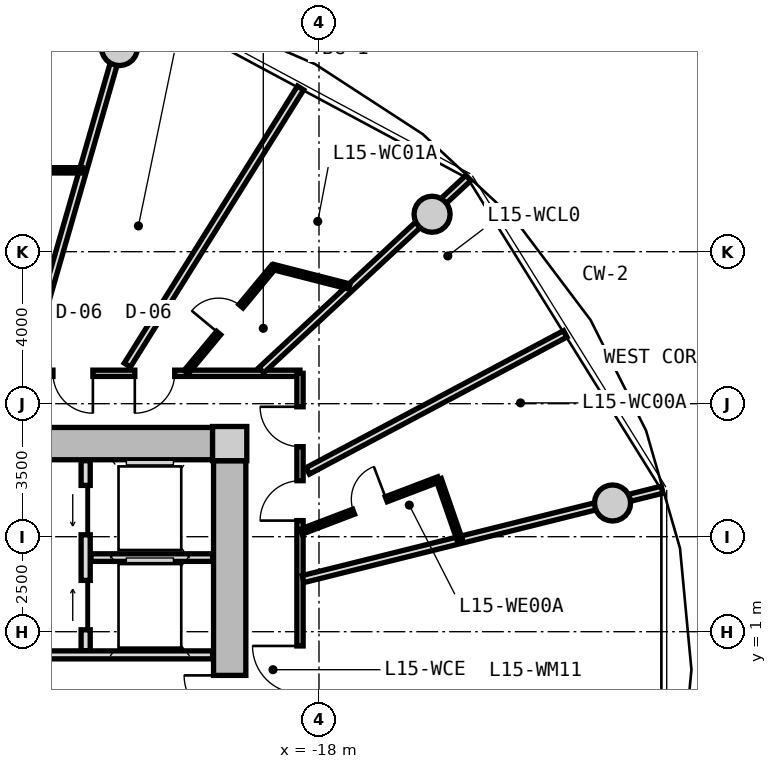
"""IFC4 building model, lengths in metres.
Left out: names, types, materials, properties, quantities, classifications, styles, units other than length and angle.
Written with IfcOpenShell. Run it as: python <this file> out.ifc"""

import sys

from ifc_helpers import new_model, si_unit, direction, frame, frame_2d, origin, origin_2d, place, context, subcontext, project, spatial, rectangle, circle, extrude, source, transform, mapped, element, fill, save


model = new_model("IFC4")
c1 = context("Model", 3, precision=1e-05, world=origin(), true_north=direction((0.0, 1.0)))
c2 = subcontext(c1, "Body", "Model", "MODEL_VIEW")
j1 = project(units=[si_unit("LENGTHUNIT", "METRE"), si_unit("PLANEANGLEUNIT", "RADIAN")], contexts=[c1])
p1 = place(None, origin())
s1 = spatial("IfcSite", under=j1, at=p1, CompositionType="ELEMENT")
p2 = place(p1, origin())
s2 = spatial("IfcBuilding", under=s1, at=p2, CompositionType="ELEMENT")
p3 = place(p2, frame((0.0, 0.0, 52.1)))
s3 = spatial("IfcBuildingStorey", under=s2, at=p3, CompositionType="ELEMENT", Elevation=52.1)
m1 = source(origin(), c2, "Body", "SweptSolid", [
    extrude(rectangle(XDim=0.9, YDim=0.9, at=origin_2d()), origin(), (0.0, 0.0, 1.0), 3.05),
])
p4 = place(p3, frame((-20.35, 5.95, 0.0), z_axis=(0.0, 0.0, 1.0), x_axis=(1.0, 0.0, 0.0)))
e1 = element("IfcColumn", 1, at=p4, inside=s3, PredefinedType="COLUMN", context=c2, shape_type="MappedRepresentation", body=[
    mapped(m1, transform((0.0, 0.0, 0.0), x_axis=(1.0, 0.0, 0.0), y_axis=(0.0, 1.0, 0.0), z_axis=(0.0, 0.0, 1.0), scale=1.0)),
])
m2 = source(origin(), c2, "Body", "SweptSolid", [
    extrude(rectangle(XDim=14.4, YDim=0.85, at=frame_2d((7.2, 0.0))), origin(), (0.0, 0.0, 1.0), 2.79),
])
p5 = place(p3, frame((-35.2, 5.95, 0.0), z_axis=(0.0, 0.0, 1.0), x_axis=(1.0, 0.0, 0.0)))
e2 = element("IfcWall", 2, at=p5, inside=s3, PredefinedType="SHEAR", context=c2, shape_type="MappedRepresentation", body=[
    mapped(m2, transform((0.0, 0.0, 0.0), x_axis=(1.0, 0.0, 0.0), y_axis=(0.0, 1.0, 0.0), z_axis=(0.0, 0.0, 1.0), scale=1.0)),
])
m3 = source(origin(), c2, "Body", "SweptSolid", [
    extrude(rectangle(XDim=11.0, YDim=0.85, at=frame_2d((5.5, 0.0))), origin(), (0.0, 0.0, 1.0), 2.79),
])
p6 = place(p3, frame((-20.35, 5.5, 0.0), z_axis=(0.0, 0.0, 1.0), x_axis=(0.0, -1.0, 0.0)))
e3 = element("IfcWall", 3, at=p6, inside=s3, PredefinedType="SHEAR", context=c2, shape_type="MappedRepresentation", body=[
    mapped(m3, transform((0.0, 0.0, 0.0), x_axis=(1.0, 0.0, 0.0), y_axis=(0.0, 1.0, 0.0), z_axis=(0.0, 0.0, 1.0), scale=1.0)),
])
p7 = place(p6, frame((5.65, 0.0, 0.0)))
e4 = element("IfcOpeningElement", 4, at=p7, cuts=e3, PredefinedType="OPENING", context=c2, shape_type="SweptSolid", body=[
    extrude(rectangle(XDim=1.2, YDim=2.15, at=frame_2d((0.6, 1.075))), frame((0.0, 0.435, 0.0), z_axis=(0.0, -1.0, 0.0), x_axis=(1.0, 0.0, 0.0)), (0.0, 0.0, 1.0), 0.87),
])
m4 = source(origin(), c2, "Body", "SweptSolid", [
    extrude(circle(Radius=0.475, at=origin_2d()), origin(), (0.0, 0.0, 1.0), 3.05),
])
for number, where, z_axis, x_axis in (
    (5, (-10.275, 4.387, 0.0), (0.0, 0.0, 1.0), (1.0, 0.0, 0.0)),
    (6, (-15.025, 11.985, 0.0), (0.0, 0.0, 1.0), (1.0, 0.0, 0.0)),
    (7, (-23.251, 16.373, 0.0), (0.0, 0.0, 1.0), (1.0, 0.0, 0.0)),
):
    element("IfcColumn", number, at=place(p3, frame(where, z_axis=z_axis, x_axis=x_axis)), inside=s3, PredefinedType="COLUMN", context=c2, shape_type="MappedRepresentation", body=[
        mapped(m4, transform((0.0, 0.0, 0.0), x_axis=(1.0, 0.0, 0.0), y_axis=(0.0, 1.0, 0.0), z_axis=(0.0, 0.0, 1.0), scale=1.0)),
    ])
m5 = source(origin(), c2, "Body", "SweptSolid", [
    extrude(rectangle(XDim=5.0, YDim=0.24, at=frame_2d((2.5, 0.0))), origin(), (0.0, 0.0, 1.0), 2.775),
])
p8 = place(p3, frame((-24.14, 0.5, 0.0), z_axis=(0.0, 0.0, 1.0), x_axis=(0.0, 1.0, 0.0)))
e8 = element("IfcWall", 8, at=p8, inside=s3, PredefinedType="PARTITIONING", context=c2, shape_type="MappedRepresentation", body=[
    mapped(m5, transform((0.0, 0.0, 0.0), x_axis=(1.0, 0.0, 0.0), y_axis=(0.0, 1.0, 0.0), z_axis=(0.0, 0.0, 1.0), scale=1.0)),
])
p9 = place(p8, frame((3.05, 0.0, 0.0)))
e9 = element("IfcOpeningElement", 9, at=p9, cuts=e8, PredefinedType="OPENING", context=c2, shape_type="SweptSolid", body=[
    extrude(rectangle(XDim=1.3, YDim=2.2, at=frame_2d((0.65, 1.1))), frame((0.0, 0.13, 0.0), z_axis=(0.0, -1.0, 0.0), x_axis=(1.0, 0.0, 0.0)), (0.0, 0.0, 1.0), 0.26),
])
p10 = place(p8, frame((0.55, 0.0, 0.0)))
e10 = element("IfcOpeningElement", 10, at=p10, cuts=e8, PredefinedType="OPENING", context=c2, shape_type="SweptSolid", body=[
    extrude(rectangle(XDim=1.3, YDim=2.2, at=frame_2d((0.65, 1.1))), frame((0.0, 0.13, 0.0), z_axis=(0.0, -1.0, 0.0), x_axis=(1.0, 0.0, 0.0)), (0.0, 0.0, 1.0), 0.26),
])
m6 = source(origin(), c2, "Body", "SweptSolid", [
    extrude(rectangle(XDim=3.2, YDim=0.2, at=frame_2d((1.6, 0.0))), origin(), (0.0, 0.0, 1.0), 2.775),
])
p11 = place(p3, frame((-24.0, 2.95, 0.0), z_axis=(0.0, 0.0, 1.0), x_axis=(1.0, 0.0, 0.0)))
e11 = element("IfcWall", 11, at=p11, inside=s3, PredefinedType="PARTITIONING", context=c2, shape_type="MappedRepresentation", body=[
    mapped(m6, transform((0.0, 0.0, 0.0), x_axis=(1.0, 0.0, 0.0), y_axis=(0.0, 1.0, 0.0), z_axis=(0.0, 0.0, 1.0), scale=1.0)),
])
m7 = source(origin(), c2, "Body", "SweptSolid", [
    extrude(rectangle(XDim=6.66, YDim=0.21, at=frame_2d((3.33, 0.0))), origin(), (0.0, 0.0, 1.0), 2.775),
])
p12 = place(p3, frame((-27.46, 0.39, 0.0), z_axis=(0.0, 0.0, 1.0), x_axis=(1.0, 0.0, 0.0)))
e12 = element("IfcWall", 12, at=p12, inside=s3, PredefinedType="PARTITIONING", context=c2, shape_type="MappedRepresentation", body=[
    mapped(m7, transform((0.0, 0.0, 0.0), x_axis=(1.0, 0.0, 0.0), y_axis=(0.0, 1.0, 0.0), z_axis=(0.0, 0.0, 1.0), scale=1.0)),
])
p13 = place(p12, frame((1.0, 0.0, 0.0)))
e13 = element("IfcOpeningElement", 13, at=p13, cuts=e12, PredefinedType="OPENING", context=c2, shape_type="SweptSolid", body=[
    extrude(rectangle(XDim=1.2, YDim=2.15, at=frame_2d((0.6, 1.075))), frame((0.0, 0.115, 0.0), z_axis=(0.0, -1.0, 0.0), x_axis=(1.0, 0.0, 0.0)), (0.0, 0.0, 1.0), 0.23),
])
m8 = source(origin(), c2, "Body", "SweptSolid", [
    extrude(rectangle(XDim=19.0, YDim=0.165, at=frame_2d((9.5, 0.0))), origin(), (0.0, 0.0, 1.0), 2.775),
])
p14 = place(p3, frame((-37.5, 7.8, 0.0), z_axis=(0.0, 0.0, 1.0), x_axis=(1.0, 0.0, 0.0)))
e14 = element("IfcWall", 14, at=p14, inside=s3, PredefinedType="PARTITIONING", context=c2, shape_type="MappedRepresentation", body=[
    mapped(m8, transform((0.0, 0.0, 0.0), x_axis=(1.0, 0.0, 0.0), y_axis=(0.0, 1.0, 0.0), z_axis=(0.0, 0.0, 1.0), scale=1.0)),
])
p15 = place(p14, frame((14.653, 0.0, 0.0)))
e15 = element("IfcOpeningElement", 15, at=p15, cuts=e14, PredefinedType="OPENING", context=c2, shape_type="SweptSolid", body=[
    extrude(rectangle(XDim=1.05, YDim=2.15, at=frame_2d((0.525, 1.075))), frame((0.0, 0.093, 0.0), z_axis=(0.0, -1.0, 0.0), x_axis=(1.0, 0.0, 0.0)), (0.0, 0.0, 1.0), 0.185),
])
p16 = place(p14, frame((12.5, 0.0, 0.0)))
e16 = element("IfcOpeningElement", 16, at=p16, cuts=e14, PredefinedType="OPENING", context=c2, shape_type="SweptSolid", body=[
    extrude(rectangle(XDim=1.05, YDim=2.15, at=frame_2d((0.525, 1.075))), frame((0.0, 0.093, 0.0), z_axis=(0.0, -1.0, 0.0), x_axis=(1.0, 0.0, 0.0)), (0.0, 0.0, 1.0), 0.185),
])
p17 = place(p14, frame((9.352, 0.0, 0.0)))
e17 = element("IfcOpeningElement", 17, at=p17, cuts=e14, PredefinedType="OPENING", context=c2, shape_type="SweptSolid", body=[
    extrude(rectangle(XDim=1.05, YDim=2.15, at=frame_2d((0.525, 1.075))), frame((0.0, 0.093, 0.0), z_axis=(0.0, -1.0, 0.0), x_axis=(1.0, 0.0, 0.0)), (0.0, 0.0, 1.0), 0.185),
])
p18 = place(p14, frame((7.806, 0.0, 0.0)))
e18 = element("IfcOpeningElement", 18, at=p18, cuts=e14, PredefinedType="OPENING", context=c2, shape_type="SweptSolid", body=[
    extrude(rectangle(XDim=1.05, YDim=2.15, at=frame_2d((0.525, 1.075))), frame((0.0, 0.093, 0.0), z_axis=(0.0, -1.0, 0.0), x_axis=(1.0, 0.0, 0.0)), (0.0, 0.0, 1.0), 0.185),
])
p19 = place(p14, frame((5.396, 0.0, 0.0)))
e19 = element("IfcOpeningElement", 19, at=p19, cuts=e14, PredefinedType="OPENING", context=c2, shape_type="SweptSolid", body=[
    extrude(rectangle(XDim=1.05, YDim=2.15, at=frame_2d((0.525, 1.075))), frame((0.0, 0.093, 0.0), z_axis=(0.0, -1.0, 0.0), x_axis=(1.0, 0.0, 0.0)), (0.0, 0.0, 1.0), 0.185),
])
p20 = place(p14, frame((2.251, 0.0, 0.0)))
e20 = element("IfcOpeningElement", 20, at=p20, cuts=e14, PredefinedType="OPENING", context=c2, shape_type="SweptSolid", body=[
    extrude(rectangle(XDim=1.05, YDim=2.15, at=frame_2d((0.525, 1.075))), frame((0.0, 0.093, 0.0), z_axis=(0.0, -1.0, 0.0), x_axis=(1.0, 0.0, 0.0)), (0.0, 0.0, 1.0), 0.185),
])
m9 = source(origin(), c2, "Body", "SweptSolid", [
    extrude(rectangle(XDim=15.6, YDim=0.165, at=frame_2d((7.8, 0.0))), origin(), (0.0, 0.0, 1.0), 2.775),
])
p21 = place(p3, frame((-18.5, 7.8, 0.0), z_axis=(0.0, 0.0, 1.0), x_axis=(0.0, -1.0, 0.0)))
e21 = element("IfcWall", 21, at=p21, inside=s3, PredefinedType="PARTITIONING", context=c2, shape_type="MappedRepresentation", body=[
    mapped(m9, transform((0.0, 0.0, 0.0), x_axis=(1.0, 0.0, 0.0), y_axis=(0.0, 1.0, 0.0), z_axis=(0.0, 0.0, 1.0), scale=1.0)),
])
p22 = place(p21, frame((12.141, 0.0, 0.0)))
e22 = element("IfcOpeningElement", 22, at=p22, cuts=e21, PredefinedType="OPENING", context=c2, shape_type="SweptSolid", body=[
    extrude(rectangle(XDim=1.25, YDim=2.2, at=frame_2d((0.625, 1.1))), frame((0.0, 0.093, 0.0), z_axis=(0.0, -1.0, 0.0), x_axis=(1.0, 0.0, 0.0)), (0.0, 0.0, 1.0), 0.185),
])
p23 = place(p21, frame((7.175, 0.0, 0.0)))
e23 = element("IfcOpeningElement", 23, at=p23, cuts=e21, PredefinedType="OPENING", context=c2, shape_type="SweptSolid", body=[
    extrude(rectangle(XDim=1.25, YDim=2.2, at=frame_2d((0.625, 1.1))), frame((0.0, 0.093, 0.0), z_axis=(0.0, -1.0, 0.0), x_axis=(1.0, 0.0, 0.0)), (0.0, 0.0, 1.0), 0.185),
])
p24 = place(p21, frame((2.826, 0.0, 0.0)))
e24 = element("IfcOpeningElement", 24, at=p24, cuts=e21, PredefinedType="OPENING", context=c2, shape_type="SweptSolid", body=[
    extrude(rectangle(XDim=1.05, YDim=2.15, at=frame_2d((0.525, 1.075))), frame((0.0, 0.093, 0.0), z_axis=(0.0, -1.0, 0.0), x_axis=(1.0, 0.0, 0.0)), (0.0, 0.0, 1.0), 0.185),
])
p25 = place(p21, frame((0.881, 0.0, 0.0)))
e25 = element("IfcOpeningElement", 25, at=p25, cuts=e21, PredefinedType="OPENING", context=c2, shape_type="SweptSolid", body=[
    extrude(rectangle(XDim=1.05, YDim=2.15, at=frame_2d((0.525, 1.075))), frame((0.0, 0.093, 0.0), z_axis=(0.0, -1.0, 0.0), x_axis=(1.0, 0.0, 0.0)), (0.0, 0.0, 1.0), 0.185),
])
m10 = source(origin(), c2, "Body", "SweptSolid", [
    extrude(rectangle(XDim=9.737, YDim=0.19, at=frame_2d((4.869, 0.0))), origin(), (0.0, 0.0, 1.0), 2.225),
])
p26 = place(p3, frame((-18.42, 2.385, 0.0), z_axis=(0.0, 0.0, 1.0), x_axis=(0.970392716238, 0.241532557375, 0.0)))
e26 = element("IfcWall", 26, at=p26, inside=s3, PredefinedType="PARTITIONING", context=c2, shape_type="MappedRepresentation", body=[
    mapped(m10, transform((0.0, 0.0, 0.0), x_axis=(1.0, 0.0, 0.0), y_axis=(0.0, 1.0, 0.0), z_axis=(0.0, 0.0, 1.0), scale=1.0)),
])
m11 = source(origin(), c2, "Body", "SweptSolid", [
    extrude(rectangle(XDim=7.435, YDim=0.19, at=frame_2d((3.717, 0.0))), origin(), (0.0, 0.0, 1.0), 2.225),
])
p27 = place(p3, frame((-19.517, 7.88, 0.0), z_axis=(0.0, 0.0, 1.0), x_axis=(0.732651956848, 0.680603489652, 0.0)))
e27 = element("IfcWall", 27, at=p27, inside=s3, PredefinedType="PARTITIONING", context=c2, shape_type="MappedRepresentation", body=[
    mapped(m11, transform((0.0, 0.0, 0.0), x_axis=(1.0, 0.0, 0.0), y_axis=(0.0, 1.0, 0.0), z_axis=(0.0, 0.0, 1.0), scale=1.0)),
])
m12 = source(origin(), c2, "Body", "SweptSolid", [
    extrude(rectangle(XDim=7.677, YDim=0.19, at=frame_2d((3.838, 0.0))), origin(), (0.0, 0.0, 1.0), 2.775),
])
p28 = place(p3, frame((-18.297, 5.231, 0.0), z_axis=(0.0, 0.0, 1.0), x_axis=(0.882725057546, 0.469889851753, 0.0)))
e28 = element("IfcWall", 28, at=p28, inside=s3, PredefinedType="PARTITIONING", context=c2, shape_type="MappedRepresentation", body=[
    mapped(m12, transform((0.0, 0.0, 0.0), x_axis=(1.0, 0.0, 0.0), y_axis=(0.0, 1.0, 0.0), z_axis=(0.0, 0.0, 1.0), scale=1.0)),
])
m13 = source(origin(), c2, "Body", "SweptSolid", [
    extrude(rectangle(XDim=3.874, YDim=0.14, at=frame_2d((1.937, 0.0))), origin(), (0.0, 0.0, 1.0), 2.775),
])
p29 = place(p3, frame((-18.47, 3.632, 0.0), z_axis=(0.0, 0.0, 1.0), x_axis=(0.934461775659, 0.35606346321, 0.0)))
e29 = element("IfcWall", 29, at=p29, inside=s3, PredefinedType="PARTITIONING", context=c2, shape_type="MappedRepresentation", body=[
    mapped(m13, transform((0.0, 0.0, 0.0), x_axis=(1.0, 0.0, 0.0), y_axis=(0.0, 1.0, 0.0), z_axis=(0.0, 0.0, 1.0), scale=1.0)),
])
p30 = place(p29, frame((1.477, 0.0, 0.0)))
e30 = element("IfcOpeningElement", 30, at=p30, cuts=e29, PredefinedType="OPENING", context=c2, shape_type="SweptSolid", body=[
    extrude(rectangle(XDim=0.92, YDim=2.1, at=frame_2d((0.46, 1.05))), frame((0.0, 0.08, 0.0), z_axis=(0.0, -1.0, 0.0), x_axis=(1.0, 0.0, 0.0)), (0.0, 0.0, 1.0), 0.16),
])
m14 = source(origin(), c2, "Body", "SweptSolid", [
    extrude(rectangle(XDim=1.676, YDim=0.14, at=frame_2d((0.838, 0.0))), origin(), (0.0, 0.0, 1.0), 2.775),
])
p31 = place(p3, frame((-14.85, 5.011, 0.0), z_axis=(0.0, 0.0, 1.0), x_axis=(0.327785970556, -0.944752008469, 0.0)))
e31 = element("IfcWall", 31, at=p31, inside=s3, PredefinedType="PARTITIONING", context=c2, shape_type="MappedRepresentation", body=[
    mapped(m14, transform((0.0, 0.0, 0.0), x_axis=(1.0, 0.0, 0.0), y_axis=(0.0, 1.0, 0.0), z_axis=(0.0, 0.0, 1.0), scale=1.0)),
])
m15 = source(origin(), c2, "Body", "SweptSolid", [
    extrude(rectangle(XDim=10.196, YDim=0.19, at=frame_2d((5.098, 0.0))), origin(), (0.0, 0.0, 1.0), 2.225),
])
p32 = place(p3, frame((-25.727, 7.88, 0.0), z_axis=(0.0, 0.0, 1.0), x_axis=(0.277136420347, 0.960830580549, 0.0)))
e32 = element("IfcWall", 32, at=p32, inside=s3, PredefinedType="PARTITIONING", context=c2, shape_type="MappedRepresentation", body=[
    mapped(m15, transform((0.0, 0.0, 0.0), x_axis=(1.0, 0.0, 0.0), y_axis=(0.0, 1.0, 0.0), z_axis=(0.0, 0.0, 1.0), scale=1.0)),
])
m16 = source(origin(), c2, "Body", "SweptSolid", [
    extrude(rectangle(XDim=8.598, YDim=0.19, at=frame_2d((4.299, 0.0))), origin(), (0.0, 0.0, 1.0), 2.775),
])
p33 = place(p3, frame((-23.043, 8.017, 0.0), z_axis=(0.0, 0.0, 1.0), x_axis=(0.530039776395, 0.847972779893, 0.0)))
e33 = element("IfcWall", 33, at=p33, inside=s3, PredefinedType="PARTITIONING", context=c2, shape_type="MappedRepresentation", body=[
    mapped(m16, transform((0.0, 0.0, 0.0), x_axis=(1.0, 0.0, 0.0), y_axis=(0.0, 1.0, 0.0), z_axis=(0.0, 0.0, 1.0), scale=1.0)),
])
m17 = source(origin(), c2, "Body", "SweptSolid", [
    extrude(rectangle(XDim=3.594, YDim=0.14, at=frame_2d((1.797, 0.0))), origin(), (0.0, 0.0, 1.0), 2.775),
])
p34 = place(p3, frame((-21.496, 7.83, 0.0), z_axis=(0.0, 0.0, 1.0), x_axis=(0.639001147083, 0.769205781326, 0.0)))
e34 = element("IfcWall", 34, at=p34, inside=s3, PredefinedType="PARTITIONING", context=c2, shape_type="MappedRepresentation", body=[
    mapped(m17, transform((0.0, 0.0, 0.0), x_axis=(1.0, 0.0, 0.0), y_axis=(0.0, 1.0, 0.0), z_axis=(0.0, 0.0, 1.0), scale=1.0)),
])
p35 = place(p34, frame((1.337, 0.0, 0.0)))
e35 = element("IfcOpeningElement", 35, at=p35, cuts=e34, PredefinedType="OPENING", context=c2, shape_type="SweptSolid", body=[
    extrude(rectangle(XDim=0.92, YDim=2.1, at=frame_2d((0.46, 1.05))), frame((0.0, 0.08, 0.0), z_axis=(0.0, -1.0, 0.0), x_axis=(1.0, 0.0, 0.0)), (0.0, 0.0, 1.0), 0.16),
])
m18 = source(origin(), c2, "Body", "SweptSolid", [
    extrude(rectangle(XDim=2.062, YDim=0.14, at=frame_2d((1.031, 0.0))), origin(), (0.0, 0.0, 1.0), 2.415),
])
p36 = place(p3, frame((-19.199, 10.595, 0.0), z_axis=(0.0, 0.0, 1.0), x_axis=(0.968776253543, -0.247936626121, 0.0)))
e36 = element("IfcWall", 36, at=p36, inside=s3, PredefinedType="PARTITIONING", context=c2, shape_type="MappedRepresentation", body=[
    mapped(m18, transform((0.0, 0.0, 0.0), x_axis=(1.0, 0.0, 0.0), y_axis=(0.0, 1.0, 0.0), z_axis=(0.0, 0.0, 1.0), scale=1.0)),
])
m19 = source(origin(), c2, "Body", "SweptSolid", [
    extrude(rectangle(XDim=1.843, YDim=0.14, at=frame_2d((0.921, 0.0))), origin(), (0.0, 0.0, 1.0), 2.775),
])
p37 = place(p3, frame((-26.072, 13.143, 0.0), z_axis=(0.0, 0.0, 1.0), x_axis=(0.999998937801, -0.001457531246, 0.0)))
e37 = element("IfcWall", 37, at=p37, inside=s3, PredefinedType="PARTITIONING", context=c2, shape_type="MappedRepresentation", body=[
    mapped(m19, transform((0.0, 0.0, 0.0), x_axis=(1.0, 0.0, 0.0), y_axis=(0.0, 1.0, 0.0), z_axis=(0.0, 0.0, 1.0), scale=1.0)),
])
m20 = source(origin(), c2, "Body", "SweptSolid", [
    extrude(rectangle(XDim=1.3, YDim=2.2, at=frame_2d((0.65, 1.1))), frame((0.0, 0.025, 0.0), z_axis=(0.0, -1.0, 0.0), x_axis=(1.0, 0.0, 0.0)), (0.0, 0.0, 1.0), 0.05),
])
p38 = place(p9, origin())
e38 = element("IfcDoor", 38, at=p38, inside=s3, OperationType="SLIDING_TO_LEFT", PredefinedType="DOOR", context=c2, shape_type="MappedRepresentation", body=[
    mapped(m20, transform((0.0, 0.0, 0.0), x_axis=(1.0, 0.0, 0.0), y_axis=(0.0, 1.0, 0.0), z_axis=(0.0, 0.0, 1.0), scale=1.0)),
])
fill(e9, e38)
p39 = place(p10, origin())
e39 = element("IfcDoor", 39, at=p39, inside=s3, OperationType="SLIDING_TO_RIGHT", PredefinedType="DOOR", context=c2, shape_type="MappedRepresentation", body=[
    mapped(m20, transform((0.0, 0.0, 0.0), x_axis=(1.0, 0.0, 0.0), y_axis=(0.0, 1.0, 0.0), z_axis=(0.0, 0.0, 1.0), scale=1.0)),
])
fill(e10, e39)
m21 = source(origin(), c2, "Body", "SweptSolid", [
    extrude(rectangle(XDim=1.2, YDim=2.15, at=frame_2d((0.6, 1.075))), frame((0.0, 0.025, 0.0), z_axis=(0.0, -1.0, 0.0), x_axis=(1.0, 0.0, 0.0)), (0.0, 0.0, 1.0), 0.05),
])
p40 = place(p7, frame((1.2, 0.0, 0.0), z_axis=(0.0, 0.0, 1.0), x_axis=(-1.0, 0.0, 0.0)))
e40 = element("IfcDoor", 40, at=p40, inside=s3, OperationType="SINGLE_SWING_RIGHT", PredefinedType="DOOR", context=c2, shape_type="MappedRepresentation", body=[
    mapped(m21, transform((0.0, 0.0, 0.0), x_axis=(1.0, 0.0, 0.0), y_axis=(0.0, 1.0, 0.0), z_axis=(0.0, 0.0, 1.0), scale=1.0)),
])
fill(e4, e40)
m22 = source(origin(), c2, "Body", "SweptSolid", [
    extrude(rectangle(XDim=1.25, YDim=2.2, at=frame_2d((0.625, 1.1))), frame((0.0, 0.025, 0.0), z_axis=(0.0, -1.0, 0.0), x_axis=(1.0, 0.0, 0.0)), (0.0, 0.0, 1.0), 0.05),
])
p41 = place(p23, frame((1.25, 0.0, 0.0), z_axis=(0.0, 0.0, 1.0), x_axis=(-1.0, 0.0, 0.0)))
e41 = element("IfcDoor", 41, at=p41, inside=s3, OperationType="SINGLE_SWING_RIGHT", PredefinedType="DOOR", context=c2, shape_type="MappedRepresentation", body=[
    mapped(m22, transform((0.0, 0.0, 0.0), x_axis=(1.0, 0.0, 0.0), y_axis=(0.0, 1.0, 0.0), z_axis=(0.0, 0.0, 1.0), scale=1.0)),
])
fill(e23, e41)
m23 = source(origin(), c2, "Body", "SweptSolid", [
    extrude(rectangle(XDim=1.05, YDim=2.15, at=frame_2d((0.525, 1.075))), frame((0.0, 0.025, 0.0), z_axis=(0.0, -1.0, 0.0), x_axis=(1.0, 0.0, 0.0)), (0.0, 0.0, 1.0), 0.05),
])
p42 = place(p24, frame((1.05, 0.0, 0.0), z_axis=(0.0, 0.0, 1.0), x_axis=(-1.0, 0.0, 0.0)))
e42 = element("IfcDoor", 42, at=p42, inside=s3, OperationType="SINGLE_SWING_LEFT", PredefinedType="DOOR", context=c2, shape_type="MappedRepresentation", body=[
    mapped(m23, transform((0.0, 0.0, 0.0), x_axis=(1.0, 0.0, 0.0), y_axis=(0.0, 1.0, 0.0), z_axis=(0.0, 0.0, 1.0), scale=1.0)),
])
fill(e24, e42)
m24 = source(origin(), c2, "Body", "SweptSolid", [
    extrude(rectangle(XDim=0.92, YDim=2.1, at=frame_2d((0.46, 1.05))), frame((0.0, 0.025, 0.0), z_axis=(0.0, -1.0, 0.0), x_axis=(1.0, 0.0, 0.0)), (0.0, 0.0, 1.0), 0.05),
])
p43 = place(p30, origin())
e43 = element("IfcDoor", 43, at=p43, inside=s3, OperationType="SINGLE_SWING_RIGHT", PredefinedType="DOOR", context=c2, shape_type="MappedRepresentation", body=[
    mapped(m24, transform((0.0, 0.0, 0.0), x_axis=(1.0, 0.0, 0.0), y_axis=(0.0, 1.0, 0.0), z_axis=(0.0, 0.0, 1.0), scale=1.0)),
])
fill(e30, e43)
p44 = place(p25, frame((1.05, 0.0, 0.0), z_axis=(0.0, 0.0, 1.0), x_axis=(-1.0, 0.0, 0.0)))
e44 = element("IfcDoor", 44, at=p44, inside=s3, OperationType="SINGLE_SWING_RIGHT", PredefinedType="DOOR", context=c2, shape_type="MappedRepresentation", body=[
    mapped(m23, transform((0.0, 0.0, 0.0), x_axis=(1.0, 0.0, 0.0), y_axis=(0.0, 1.0, 0.0), z_axis=(0.0, 0.0, 1.0), scale=1.0)),
])
fill(e25, e44)
p45 = place(p15, frame((1.05, 0.0, 0.0), z_axis=(0.0, 0.0, 1.0), x_axis=(-1.0, 0.0, 0.0)))
e45 = element("IfcDoor", 45, at=p45, inside=s3, OperationType="SINGLE_SWING_RIGHT", PredefinedType="DOOR", context=c2, shape_type="MappedRepresentation", body=[
    mapped(m23, transform((0.0, 0.0, 0.0), x_axis=(1.0, 0.0, 0.0), y_axis=(0.0, 1.0, 0.0), z_axis=(0.0, 0.0, 1.0), scale=1.0)),
])
fill(e15, e45)
p46 = place(p35, origin())
e46 = element("IfcDoor", 46, at=p46, inside=s3, OperationType="SINGLE_SWING_LEFT", PredefinedType="DOOR", context=c2, shape_type="MappedRepresentation", body=[
    mapped(m24, transform((0.0, 0.0, 0.0), x_axis=(1.0, 0.0, 0.0), y_axis=(0.0, 1.0, 0.0), z_axis=(0.0, 0.0, 1.0), scale=1.0)),
])
fill(e35, e46)
p47 = place(p16, frame((1.05, 0.0, 0.0), z_axis=(0.0, 0.0, 1.0), x_axis=(-1.0, 0.0, 0.0)))
e47 = element("IfcDoor", 47, at=p47, inside=s3, OperationType="SINGLE_SWING_LEFT", PredefinedType="DOOR", context=c2, shape_type="MappedRepresentation", body=[
    mapped(m23, transform((0.0, 0.0, 0.0), x_axis=(1.0, 0.0, 0.0), y_axis=(0.0, 1.0, 0.0), z_axis=(0.0, 0.0, 1.0), scale=1.0)),
])
fill(e16, e47)
save(model, sys.argv[1])
